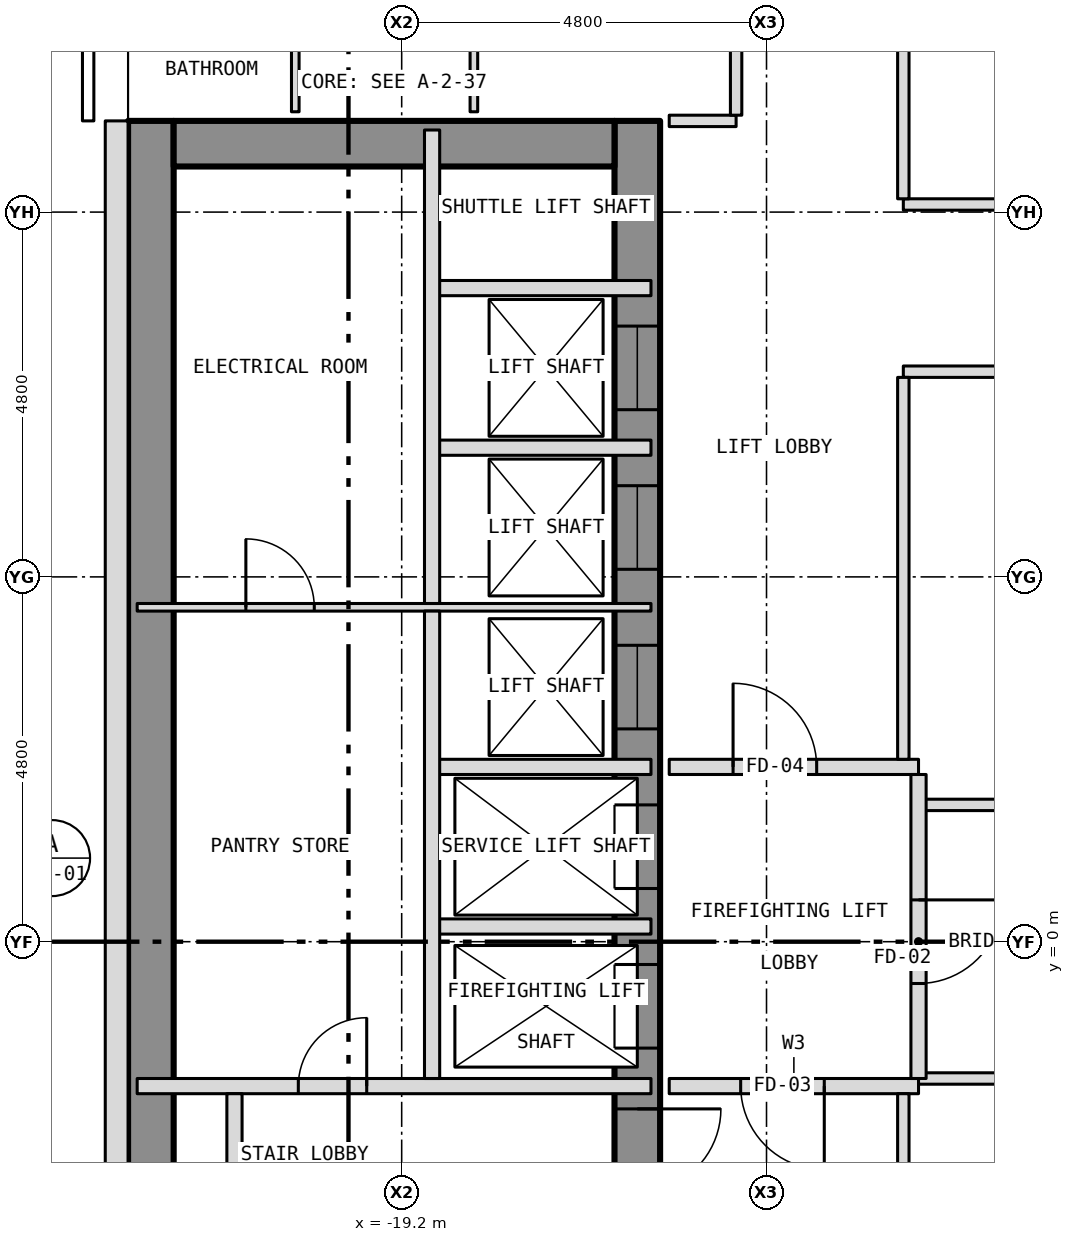
"""IFC4 building model, lengths in metres.
Left out: names, types, materials, properties, quantities, classifications, styles, units other than length and angle.
Written with IfcOpenShell. Run it as: python <this file> out.ifc"""

import sys

from ifc_helpers import new_model, si_unit, direction, frame, frame_2d, origin, place, context, subcontext, project, spatial, rectangle, extrude, element, fill, save


model = new_model("IFC4")
c1 = context("Model", 3, precision=1e-05, world=origin(), true_north=direction((0.0, 1.0)))
c2 = subcontext(c1, "Body", "Model", "MODEL_VIEW")
j1 = project(units=[si_unit("LENGTHUNIT", "METRE"), si_unit("PLANEANGLEUNIT", "RADIAN")], contexts=[c1])
p1 = place(None, origin())
s1 = spatial("IfcSite", under=j1, at=p1, CompositionType="ELEMENT")
p2 = place(p1, origin())
s2 = spatial("IfcBuilding", under=s1, at=p2, CompositionType="ELEMENT")
p3 = place(p2, frame((0.0, 0.0, 134.5)))
s3 = spatial("IfcBuildingStorey", under=s2, at=p3, CompositionType="ELEMENT", Elevation=134.5)
p4 = place(p3, frame((-16.1, -10.8, 0.0), z_axis=(0.0, 0.0, 1.0), x_axis=(0.0, 1.0, 0.0)))
e1 = element("IfcWall", 1, at=p4, inside=s3, PredefinedType="SHEAR", context=c2, shape_type="SweptSolid", body=[
    extrude(rectangle(XDim=21.6, YDim=0.6, at=frame_2d((10.8, 0.0))), origin(), (0.0, 0.0, 1.0), 2.9),
])
p5 = place(p4, frame((9.4, 0.0, 0.0)))
e2 = element("IfcOpeningElement", 2, at=p5, cuts=e1, PredefinedType="OPENING", context=c2, shape_type="SweptSolid", body=[
    extrude(rectangle(XDim=1.1, YDim=2.1, at=frame_2d((0.55, 1.05))), frame((0.0, 0.312, 0.0), z_axis=(0.0, -1.0, 0.0), x_axis=(1.0, 0.0, 0.0)), (0.0, 0.0, 1.0), 0.624),
])
p6 = place(p4, frame((11.5, 0.0, 0.0)))
e3 = element("IfcOpeningElement", 3, at=p6, cuts=e1, PredefinedType="OPENING", context=c2, shape_type="SweptSolid", body=[
    extrude(rectangle(XDim=1.1, YDim=2.1, at=frame_2d((0.55, 1.05))), frame((0.0, 0.312, 0.0), z_axis=(0.0, -1.0, 0.0), x_axis=(1.0, 0.0, 0.0)), (0.0, 0.0, 1.0), 0.624),
])
p7 = place(p4, frame((13.6, 0.0, 0.0)))
e4 = element("IfcOpeningElement", 4, at=p7, cuts=e1, PredefinedType="OPENING", context=c2, shape_type="SweptSolid", body=[
    extrude(rectangle(XDim=1.1, YDim=2.1, at=frame_2d((0.55, 1.05))), frame((0.0, 0.312, 0.0), z_axis=(0.0, -1.0, 0.0), x_axis=(1.0, 0.0, 0.0)), (0.0, 0.0, 1.0), 0.624),
])
p8 = place(p4, frame((15.7, 0.0, 0.0)))
e5 = element("IfcOpeningElement", 5, at=p8, cuts=e1, PredefinedType="OPENING", context=c2, shape_type="SweptSolid", body=[
    extrude(rectangle(XDim=1.1, YDim=2.1, at=frame_2d((0.55, 1.05))), frame((0.0, 0.312, 0.0), z_axis=(0.0, -1.0, 0.0), x_axis=(1.0, 0.0, 0.0)), (0.0, 0.0, 1.0), 0.624),
])
p9 = place(p4, frame((17.8, 0.0, 0.0)))
e6 = element("IfcOpeningElement", 6, at=p9, cuts=e1, PredefinedType="OPENING", context=c2, shape_type="SweptSolid", body=[
    extrude(rectangle(XDim=1.1, YDim=2.1, at=frame_2d((0.55, 1.05))), frame((0.0, 0.312, 0.0), z_axis=(0.0, -1.0, 0.0), x_axis=(1.0, 0.0, 0.0)), (0.0, 0.0, 1.0), 0.624),
])
p10 = place(p4, frame((0.758, 0.0, 0.0)))
e7 = element("IfcOpeningElement", 7, at=p10, cuts=e1, PredefinedType="OPENING", context=c2, shape_type="SweptSolid", body=[
    extrude(rectangle(XDim=1.1, YDim=2.1, at=frame_2d((0.55, 1.05))), frame((0.0, 0.312, 0.0), z_axis=(0.0, -1.0, 0.0), x_axis=(1.0, 0.0, 0.0)), (0.0, 0.0, 1.0), 0.624),
])
p11 = place(p4, frame((7.5, 0.0, 0.0)))
e8 = element("IfcOpeningElement", 8, at=p11, cuts=e1, PredefinedType="OPENING", context=c2, shape_type="SweptSolid", body=[
    extrude(rectangle(XDim=1.1, YDim=2.1, at=frame_2d((0.55, 1.05))), frame((0.0, 0.312, 0.0), z_axis=(0.0, -1.0, 0.0), x_axis=(1.0, 0.0, 0.0)), (0.0, 0.0, 1.0), 0.624),
])
p12 = place(p3, frame((-22.5, -10.8, 0.0), z_axis=(0.0, 0.0, 1.0), x_axis=(0.0, 1.0, 0.0)))
e9 = element("IfcWall", 9, at=p12, inside=s3, PredefinedType="SHEAR", context=c2, shape_type="SweptSolid", body=[
    extrude(rectangle(XDim=21.6, YDim=0.6, at=frame_2d((10.8, 0.0))), origin(), (0.0, 0.0, 1.0), 2.9),
])
p13 = place(p3, frame((-22.2, 10.5, 0.0), z_axis=(0.0, 0.0, 1.0), x_axis=(1.0, 0.0, 0.0)))
e10 = element("IfcWall", 10, at=p13, inside=s3, PredefinedType="SHEAR", context=c2, shape_type="SweptSolid", body=[
    extrude(rectangle(XDim=5.8, YDim=0.6, at=frame_2d((2.9, 0.0))), origin(), (0.0, 0.0, 1.0), 2.9),
])
p14 = place(p3, frame((-22.95, 10.8, 0.0), z_axis=(0.0, 0.0, 1.0), x_axis=(0.0, -1.0, 0.0)))
e11 = element("IfcWall", 11, at=p14, inside=s3, PredefinedType="SOLIDWALL", context=c2, shape_type="SweptSolid", body=[
    extrude(rectangle(XDim=21.6, YDim=0.3, at=frame_2d((10.8, 0.0))), origin(), (0.0, 0.0, 1.0), 3.5),
])
p15 = place(p14, frame((18.05, 0.0, 1.0)))
e12 = element("IfcOpeningElement", 12, at=p15, cuts=e11, PredefinedType="OPENING", context=c2, shape_type="SweptSolid", body=[
    extrude(rectangle(XDim=0.6, YDim=1.5, at=frame_2d((0.3, 0.75))), frame((0.0, 0.162, 0.0), z_axis=(0.0, -1.0, 0.0), x_axis=(1.0, 0.0, 0.0)), (0.0, 0.0, 1.0), 0.324),
])
p16 = place(p3, frame((-22.68, -1.9, 0.0), z_axis=(0.0, 0.0, 1.0), x_axis=(1.0, 0.0, 0.0)))
e13 = element("IfcWall", 13, at=p16, inside=s3, PredefinedType="PARTITIONING", context=c2, shape_type="SweptSolid", body=[
    extrude(rectangle(XDim=6.76, YDim=0.2, at=frame_2d((3.38, 0.0))), origin(), (0.0, 0.0, 1.0), 2.9),
])
p17 = place(p16, frame((2.12, 0.0, 0.0)))
e14 = element("IfcOpeningElement", 14, at=p17, cuts=e13, PredefinedType="OPENING", context=c2, shape_type="SweptSolid", body=[
    extrude(rectangle(XDim=0.9, YDim=2.1, at=frame_2d((0.45, 1.05))), frame((0.0, 0.112, 0.0), z_axis=(0.0, -1.0, 0.0), x_axis=(1.0, 0.0, 0.0)), (0.0, 0.0, 1.0), 0.224),
])
p18 = place(p3, frame((-15.68, -1.9, 0.0), z_axis=(0.0, 0.0, 1.0), x_axis=(1.0, 0.0, 0.0)))
e15 = element("IfcWall", 15, at=p18, inside=s3, PredefinedType="PARTITIONING", context=c2, shape_type="SweptSolid", body=[
    extrude(rectangle(XDim=3.28, YDim=0.2, at=frame_2d((1.64, 0.0))), origin(), (0.0, 0.0, 1.0), 3.2),
])
p19 = place(p18, frame((0.94, 0.0, 0.0)))
e16 = element("IfcOpeningElement", 16, at=p19, cuts=e15, PredefinedType="OPENING", context=c2, shape_type="SweptSolid", body=[
    extrude(rectangle(XDim=1.1, YDim=2.1, at=frame_2d((0.55, 1.05))), frame((0.0, 0.112, 0.0), z_axis=(0.0, -1.0, 0.0), x_axis=(1.0, 0.0, 0.0)), (0.0, 0.0, 1.0), 0.224),
])
p20 = place(p3, frame((-12.4, -1.8, 0.0), z_axis=(0.0, 0.0, 1.0), x_axis=(1.0, 0.0, 0.0)))
e17 = element("IfcWall", 17, at=p20, inside=s3, PredefinedType="PARTITIONING", context=c2, shape_type="SweptSolid", body=[
    extrude(rectangle(XDim=4.48, YDim=0.15, at=frame_2d((2.24, 0.0))), origin(), (0.0, 0.0, 1.0), 3.2),
])
p21 = place(p3, frame((-18.8, 0.2, 0.0), z_axis=(0.0, 0.0, 1.0), x_axis=(1.0, 0.0, 0.0)))
e18 = element("IfcWall", 18, at=p21, inside=s3, PredefinedType="PARTITIONING", context=c2, shape_type="SweptSolid", body=[
    extrude(rectangle(XDim=2.88, YDim=0.2, at=frame_2d((1.44, 0.0))), origin(), (0.0, 0.0, 1.0), 2.9),
])
p22 = place(p3, frame((-12.4, 1.8, 0.0), z_axis=(0.0, 0.0, 1.0), x_axis=(1.0, 0.0, 0.0)))
e19 = element("IfcWall", 19, at=p22, inside=s3, PredefinedType="PARTITIONING", context=c2, shape_type="SweptSolid", body=[
    extrude(rectangle(XDim=4.48, YDim=0.15, at=frame_2d((2.24, 0.0))), origin(), (0.0, 0.0, 1.0), 3.2),
])
p23 = place(p3, frame((-18.8, 2.3, 0.0), z_axis=(0.0, 0.0, 1.0), x_axis=(1.0, 0.0, 0.0)))
e20 = element("IfcWall", 20, at=p23, inside=s3, PredefinedType="PARTITIONING", context=c2, shape_type="SweptSolid", body=[
    extrude(rectangle(XDim=2.88, YDim=0.2, at=frame_2d((1.44, 0.0))), origin(), (0.0, 0.0, 1.0), 2.9),
])
p24 = place(p3, frame((-15.68, 2.3, 0.0), z_axis=(0.0, 0.0, 1.0), x_axis=(1.0, 0.0, 0.0)))
e21 = element("IfcWall", 21, at=p24, inside=s3, PredefinedType="PARTITIONING", context=c2, shape_type="SweptSolid", body=[
    extrude(rectangle(XDim=3.28, YDim=0.2, at=frame_2d((1.64, 0.0))), origin(), (0.0, 0.0, 1.0), 3.2),
])
p25 = place(p24, frame((0.84, 0.0, 0.0)))
e22 = element("IfcOpeningElement", 22, at=p25, cuts=e21, PredefinedType="OPENING", context=c2, shape_type="SweptSolid", body=[
    extrude(rectangle(XDim=1.1, YDim=2.1, at=frame_2d((0.55, 1.05))), frame((0.0, 0.112, 0.0), z_axis=(0.0, -1.0, 0.0), x_axis=(1.0, 0.0, 0.0)), (0.0, 0.0, 1.0), 0.224),
])
p26 = place(p3, frame((-22.68, 4.4, 0.0), z_axis=(0.0, 0.0, 1.0), x_axis=(1.0, 0.0, 0.0)))
e23 = element("IfcWall", 23, at=p26, inside=s3, PredefinedType="PARTITIONING", context=c2, shape_type="SweptSolid", body=[
    extrude(rectangle(XDim=6.76, YDim=0.1, at=frame_2d((3.38, 0.0))), origin(), (0.0, 0.0, 1.0), 2.9),
])
p27 = place(p26, frame((1.43, 0.0, 0.0)))
e24 = element("IfcOpeningElement", 24, at=p27, cuts=e23, PredefinedType="OPENING", context=c2, shape_type="SweptSolid", body=[
    extrude(rectangle(XDim=0.9, YDim=2.1, at=frame_2d((0.45, 1.05))), frame((0.0, 0.062, 0.0), z_axis=(0.0, -1.0, 0.0), x_axis=(1.0, 0.0, 0.0)), (0.0, 0.0, 1.0), 0.124),
])
p28 = place(p3, frame((-18.8, 6.5, 0.0), z_axis=(0.0, 0.0, 1.0), x_axis=(1.0, 0.0, 0.0)))
e25 = element("IfcWall", 25, at=p28, inside=s3, PredefinedType="PARTITIONING", context=c2, shape_type="SweptSolid", body=[
    extrude(rectangle(XDim=2.88, YDim=0.2, at=frame_2d((1.44, 0.0))), origin(), (0.0, 0.0, 1.0), 2.9),
])
p29 = place(p3, frame((-12.6, 7.5, 0.0), z_axis=(0.0, 0.0, 1.0), x_axis=(1.0, 0.0, 0.0)))
e26 = element("IfcWall", 26, at=p29, inside=s3, PredefinedType="PARTITIONING", context=c2, shape_type="SweptSolid", body=[
    extrude(rectangle(XDim=4.68, YDim=0.15, at=frame_2d((2.34, 0.0))), origin(), (0.0, 0.0, 1.0), 3.2),
])
p30 = place(p29, frame((1.875, 0.0, 0.0)))
e27 = element("IfcOpeningElement", 27, at=p30, cuts=e26, PredefinedType="OPENING", context=c2, shape_type="SweptSolid", body=[
    extrude(rectangle(XDim=0.9, YDim=2.1, at=frame_2d((0.45, 1.05))), frame((0.0, 0.087, 0.0), z_axis=(0.0, -1.0, 0.0), x_axis=(1.0, 0.0, 0.0)), (0.0, 0.0, 1.0), 0.174),
])
p31 = place(p3, frame((-18.8, 8.6, 0.0), z_axis=(0.0, 0.0, 1.0), x_axis=(1.0, 0.0, 0.0)))
e28 = element("IfcWall", 28, at=p31, inside=s3, PredefinedType="PARTITIONING", context=c2, shape_type="SweptSolid", body=[
    extrude(rectangle(XDim=2.88, YDim=0.2, at=frame_2d((1.44, 0.0))), origin(), (0.0, 0.0, 1.0), 2.9),
])
p32 = place(p3, frame((-12.6, 9.7, 0.0), z_axis=(0.0, 0.0, 1.0), x_axis=(1.0, 0.0, 0.0)))
e29 = element("IfcWall", 29, at=p32, inside=s3, PredefinedType="PARTITIONING", context=c2, shape_type="SweptSolid", body=[
    extrude(rectangle(XDim=2.801, YDim=0.15, at=frame_2d((1.4, 0.0))), origin(), (0.0, 0.0, 1.0), 2.578),
])
p33 = place(p32, frame((1.275, 0.0, 0.0)))
e30 = element("IfcOpeningElement", 30, at=p33, cuts=e29, PredefinedType="OPENING", context=c2, shape_type="SweptSolid", body=[
    extrude(rectangle(XDim=0.9, YDim=2.1, at=frame_2d((0.45, 1.05))), frame((0.0, 0.087, 0.0), z_axis=(0.0, -1.0, 0.0), x_axis=(1.0, 0.0, 0.0)), (0.0, 0.0, 1.0), 0.174),
])
p34 = place(p3, frame((-15.68, 10.8, 0.0), z_axis=(0.0, 0.0, 1.0), x_axis=(1.0, 0.0, 0.0)))
e31 = element("IfcWall", 31, at=p34, inside=s3, PredefinedType="PARTITIONING", context=c2, shape_type="SweptSolid", body=[
    extrude(rectangle(XDim=0.88, YDim=0.15, at=frame_2d((0.44, 0.0))), origin(), (0.0, 0.0, 1.0), 3.2),
])
p35 = place(p3, frame((-21.4, -10.68, 0.0), z_axis=(0.0, 0.0, 1.0), x_axis=(0.0, 1.0, 0.0)))
e32 = element("IfcWall", 32, at=p35, inside=s3, PredefinedType="PARTITIONING", context=c2, shape_type="SweptSolid", body=[
    extrude(rectangle(XDim=8.68, YDim=0.2, at=frame_2d((4.34, 0.0))), origin(), (0.0, 0.0, 1.0), 2.9),
])
p36 = place(p35, frame((1.21, 0.0, 0.0)))
e33 = element("IfcOpeningElement", 33, at=p36, cuts=e32, PredefinedType="OPENING", context=c2, shape_type="SweptSolid", body=[
    extrude(rectangle(XDim=0.9, YDim=2.1, at=frame_2d((0.45, 1.05))), frame((0.0, 0.112, 0.0), z_axis=(0.0, -1.0, 0.0), x_axis=(1.0, 0.0, 0.0)), (0.0, 0.0, 1.0), 0.224),
])
p37 = place(p35, frame((5.66, 0.0, 0.0)))
e34 = element("IfcOpeningElement", 34, at=p37, cuts=e32, PredefinedType="OPENING", context=c2, shape_type="SweptSolid", body=[
    extrude(rectangle(XDim=0.9, YDim=2.1, at=frame_2d((0.45, 1.05))), frame((0.0, 0.112, 0.0), z_axis=(0.0, -1.0, 0.0), x_axis=(1.0, 0.0, 0.0)), (0.0, 0.0, 1.0), 0.224),
])
p38 = place(p3, frame((-20.6, 10.92, 0.0), z_axis=(0.0, 0.0, 1.0), x_axis=(0.0, 1.0, 0.0)))
e35 = element("IfcWall", 35, at=p38, inside=s3, PredefinedType="PARTITIONING", context=c2, shape_type="SweptSolid", body=[
    extrude(rectangle(XDim=3.03, YDim=0.1, at=frame_2d((1.515, 0.0))), origin(), (0.0, 0.0, 1.0), 3.2),
])
p39 = place(p38, frame((1.67, 0.0, 0.0)))
e36 = element("IfcOpeningElement", 36, at=p39, cuts=e35, PredefinedType="OPENING", context=c2, shape_type="SweptSolid", body=[
    extrude(rectangle(XDim=0.9, YDim=2.1, at=frame_2d((0.45, 1.05))), frame((0.0, 0.062, 0.0), z_axis=(0.0, -1.0, 0.0), x_axis=(1.0, 0.0, 0.0)), (0.0, 0.0, 1.0), 0.124),
])
p40 = place(p3, frame((-18.8, -1.8, 0.0), z_axis=(0.0, 0.0, 1.0), x_axis=(0.0, 1.0, 0.0)))
e37 = element("IfcWall", 37, at=p40, inside=s3, PredefinedType="PARTITIONING", context=c2, shape_type="SweptSolid", body=[
    extrude(rectangle(XDim=6.15, YDim=0.2, at=frame_2d((3.075, 0.0))), origin(), (0.0, 0.0, 1.0), 2.9),
])
p41 = place(p3, frame((-18.8, 4.45, 0.0), z_axis=(0.0, 0.0, 1.0), x_axis=(0.0, 1.0, 0.0)))
e38 = element("IfcWall", 38, at=p41, inside=s3, PredefinedType="PARTITIONING", context=c2, shape_type="SweptSolid", body=[
    extrude(rectangle(XDim=6.23, YDim=0.2, at=frame_2d((3.115, 0.0))), origin(), (0.0, 0.0, 1.0), 2.9),
])
p42 = place(p3, frame((-18.25, 10.92, 0.0), z_axis=(0.0, 0.0, 1.0), x_axis=(0.0, 1.0, 0.0)))
e39 = element("IfcWall", 39, at=p42, inside=s3, PredefinedType="PARTITIONING", context=c2, shape_type="SweptSolid", body=[
    extrude(rectangle(XDim=7.271, YDim=0.1, at=frame_2d((3.635, 0.0))), origin(), (0.0, 0.0, 1.0), 3.2),
])
p43 = place(p42, frame((5.43, 0.0, 0.0)))
e40 = element("IfcOpeningElement", 40, at=p43, cuts=e39, PredefinedType="OPENING", context=c2, shape_type="SweptSolid", body=[
    extrude(rectangle(XDim=0.9, YDim=2.1, at=frame_2d((0.45, 1.05))), frame((0.0, 0.062, 0.0), z_axis=(0.0, -1.0, 0.0), x_axis=(1.0, 0.0, 0.0)), (0.0, 0.0, 1.0), 0.124),
])
p44 = place(p3, frame((-14.8, 10.875, 0.0), z_axis=(0.0, 0.0, 1.0), x_axis=(0.0, 1.0, 0.0)))
e41 = element("IfcWall", 41, at=p44, inside=s3, PredefinedType="PARTITIONING", context=c2, shape_type="SweptSolid", body=[
    extrude(rectangle(XDim=3.85, YDim=0.15, at=frame_2d((1.925, 0.0))), origin(), (0.0, 0.0, 1.0), 3.2),
])
p45 = place(p44, frame((2.325, 0.0, 0.0)))
e42 = element("IfcOpeningElement", 42, at=p45, cuts=e41, PredefinedType="OPENING", context=c2, shape_type="SweptSolid", body=[
    extrude(rectangle(XDim=1.0, YDim=2.1, at=frame_2d((0.5, 1.05))), frame((0.0, 0.087, 0.0), z_axis=(0.0, -1.0, 0.0), x_axis=(1.0, 0.0, 0.0)), (0.0, 0.0, 1.0), 0.174),
])
p46 = place(p3, frame((-12.6, -12.525, 0.0), z_axis=(0.0, 0.0, 1.0), x_axis=(0.0, 1.0, 0.0)))
e43 = element("IfcWall", 43, at=p46, inside=s3, PredefinedType="PARTITIONING", context=c2, shape_type="SweptSolid", body=[
    extrude(rectangle(XDim=10.525, YDim=0.15, at=frame_2d((5.262, 0.0))), origin(), (0.0, 0.0, 1.0), 3.2),
])
p47 = place(p46, frame((4.825, 0.0, 0.0)))
e44 = element("IfcOpeningElement", 44, at=p47, cuts=e43, PredefinedType="OPENING", context=c2, shape_type="SweptSolid", body=[
    extrude(rectangle(XDim=0.9, YDim=2.1, at=frame_2d((0.45, 1.05))), frame((0.0, 0.087, 0.0), z_axis=(0.0, -1.0, 0.0), x_axis=(1.0, 0.0, 0.0)), (0.0, 0.0, 1.0), 0.174),
])
p48 = place(p3, frame((-12.6, 2.4, 0.0), z_axis=(0.0, 0.0, 1.0), x_axis=(0.0, 1.0, 0.0)))
e45 = element("IfcWall", 45, at=p48, inside=s3, PredefinedType="PARTITIONING", context=c2, shape_type="SweptSolid", body=[
    extrude(rectangle(XDim=5.025, YDim=0.15, at=frame_2d((2.513, 0.0))), origin(), (0.0, 0.0, 1.0), 3.2),
])
p49 = place(p3, frame((-12.6, 9.775, 0.0), z_axis=(0.0, 0.0, 1.0), x_axis=(0.0, 1.0, 0.0)))
e46 = element("IfcWall", 46, at=p49, inside=s3, PredefinedType="PARTITIONING", context=c2, shape_type="SweptSolid", body=[
    extrude(rectangle(XDim=2.75, YDim=0.15, at=frame_2d((1.375, 0.0))), origin(), (0.0, 0.0, 1.0), 3.2),
])
p50 = place(p3, frame((-12.4, -1.8, 0.0), z_axis=(0.0, 0.0, 1.0), x_axis=(0.0, 1.0, 0.0)))
e47 = element("IfcWall", 47, at=p50, inside=s3, PredefinedType="PARTITIONING", context=c2, shape_type="SweptSolid", body=[
    extrude(rectangle(XDim=4.0, YDim=0.2, at=frame_2d((2.0, 0.0))), origin(), (0.0, 0.0, 1.0), 3.2),
])
p51 = place(p50, frame((1.25, 0.0, 0.0)))
e48 = element("IfcOpeningElement", 48, at=p51, cuts=e47, PredefinedType="OPENING", context=c2, shape_type="SweptSolid", body=[
    extrude(rectangle(XDim=1.1, YDim=2.1, at=frame_2d((0.55, 1.05))), frame((0.0, 0.112, 0.0), z_axis=(0.0, -1.0, 0.0), x_axis=(1.0, 0.0, 0.0)), (0.0, 0.0, 1.0), 0.224),
])
p52 = place(p5, origin())
e49 = element("IfcDoor", 49, at=p52, inside=s3, OperationType="SLIDING_TO_LEFT", PredefinedType="DOOR", context=c2, shape_type="SweptSolid", body=[
    extrude(rectangle(XDim=1.1, YDim=2.1, at=frame_2d((0.55, 1.05))), frame((0.0, 0.025, 0.0), z_axis=(0.0, -1.0, 0.0), x_axis=(1.0, 0.0, 0.0)), (0.0, 0.0, 1.0), 0.05),
])
fill(e2, e49)
p53 = place(p6, origin())
e50 = element("IfcDoor", 50, at=p53, inside=s3, OperationType="SLIDING_TO_LEFT", PredefinedType="DOOR", context=c2, shape_type="SweptSolid", body=[
    extrude(rectangle(XDim=1.1, YDim=2.1, at=frame_2d((0.55, 1.05))), frame((0.0, 0.025, 0.0), z_axis=(0.0, -1.0, 0.0), x_axis=(1.0, 0.0, 0.0)), (0.0, 0.0, 1.0), 0.05),
])
fill(e3, e50)
p54 = place(p7, origin())
e51 = element("IfcDoor", 51, at=p54, inside=s3, OperationType="SLIDING_TO_LEFT", PredefinedType="DOOR", context=c2, shape_type="SweptSolid", body=[
    extrude(rectangle(XDim=1.1, YDim=2.1, at=frame_2d((0.55, 1.05))), frame((0.0, 0.025, 0.0), z_axis=(0.0, -1.0, 0.0), x_axis=(1.0, 0.0, 0.0)), (0.0, 0.0, 1.0), 0.05),
])
fill(e4, e51)
p55 = place(p8, origin())
e52 = element("IfcDoor", 52, at=p55, inside=s3, OperationType="SLIDING_TO_LEFT", PredefinedType="DOOR", context=c2, shape_type="SweptSolid", body=[
    extrude(rectangle(XDim=1.1, YDim=2.1, at=frame_2d((0.55, 1.05))), frame((0.0, 0.025, 0.0), z_axis=(0.0, -1.0, 0.0), x_axis=(1.0, 0.0, 0.0)), (0.0, 0.0, 1.0), 0.05),
])
fill(e5, e52)
p56 = place(p9, origin())
e53 = element("IfcDoor", 53, at=p56, inside=s3, OperationType="SLIDING_TO_LEFT", PredefinedType="DOOR", context=c2, shape_type="SweptSolid", body=[
    extrude(rectangle(XDim=1.1, YDim=2.1, at=frame_2d((0.55, 1.05))), frame((0.0, 0.025, 0.0), z_axis=(0.0, -1.0, 0.0), x_axis=(1.0, 0.0, 0.0)), (0.0, 0.0, 1.0), 0.05),
])
fill(e6, e53)
p57 = place(p11, origin())
e54 = element("IfcDoor", 54, at=p57, inside=s3, OperationType="SINGLE_SWING_RIGHT", PredefinedType="DOOR", context=c2, shape_type="SweptSolid", body=[
    extrude(rectangle(XDim=1.1, YDim=2.1, at=frame_2d((0.55, 1.05))), frame((0.0, 0.025, 0.0), z_axis=(0.0, -1.0, 0.0), x_axis=(1.0, 0.0, 0.0)), (0.0, 0.0, 1.0), 0.05),
])
fill(e8, e54)
p58 = place(p17, origin())
e55 = element("IfcDoor", 55, at=p58, inside=s3, OperationType="SINGLE_SWING_RIGHT", PredefinedType="DOOR", context=c2, shape_type="SweptSolid", body=[
    extrude(rectangle(XDim=0.9, YDim=2.1, at=frame_2d((0.45, 1.05))), frame((0.0, 0.025, 0.0), z_axis=(0.0, -1.0, 0.0), x_axis=(1.0, 0.0, 0.0)), (0.0, 0.0, 1.0), 0.05),
])
fill(e14, e55)
p59 = place(p27, origin())
e56 = element("IfcDoor", 56, at=p59, inside=s3, OperationType="SINGLE_SWING_LEFT", PredefinedType="DOOR", context=c2, shape_type="SweptSolid", body=[
    extrude(rectangle(XDim=0.9, YDim=2.1, at=frame_2d((0.45, 1.05))), frame((0.0, 0.025, 0.0), z_axis=(0.0, -1.0, 0.0), x_axis=(1.0, 0.0, 0.0)), (0.0, 0.0, 1.0), 0.05),
])
fill(e24, e56)
p60 = place(p51, origin())
e57 = element("IfcDoor", 57, at=p60, inside=s3, OperationType="SINGLE_SWING_RIGHT", PredefinedType="DOOR", context=c2, shape_type="SweptSolid", body=[
    extrude(rectangle(XDim=1.1, YDim=2.1, at=frame_2d((0.55, 1.05))), frame((0.0, 0.025, 0.0), z_axis=(0.0, -1.0, 0.0), x_axis=(1.0, 0.0, 0.0)), (0.0, 0.0, 1.0), 0.05),
])
fill(e48, e57)
p61 = place(p19, origin())
e58 = element("IfcDoor", 58, at=p61, inside=s3, OperationType="SINGLE_SWING_RIGHT", PredefinedType="DOOR", context=c2, shape_type="SweptSolid", body=[
    extrude(rectangle(XDim=1.1, YDim=2.1, at=frame_2d((0.55, 1.05))), frame((0.0, 0.025, 0.0), z_axis=(0.0, -1.0, 0.0), x_axis=(1.0, 0.0, 0.0)), (0.0, 0.0, 1.0), 0.05),
])
fill(e16, e58)
p62 = place(p25, origin())
e59 = element("IfcDoor", 59, at=p62, inside=s3, OperationType="SINGLE_SWING_LEFT", PredefinedType="DOOR", context=c2, shape_type="SweptSolid", body=[
    extrude(rectangle(XDim=1.1, YDim=2.1, at=frame_2d((0.55, 1.05))), frame((0.0, 0.025, 0.0), z_axis=(0.0, -1.0, 0.0), x_axis=(1.0, 0.0, 0.0)), (0.0, 0.0, 1.0), 0.05),
])
fill(e22, e59)
save(model, sys.argv[1])
